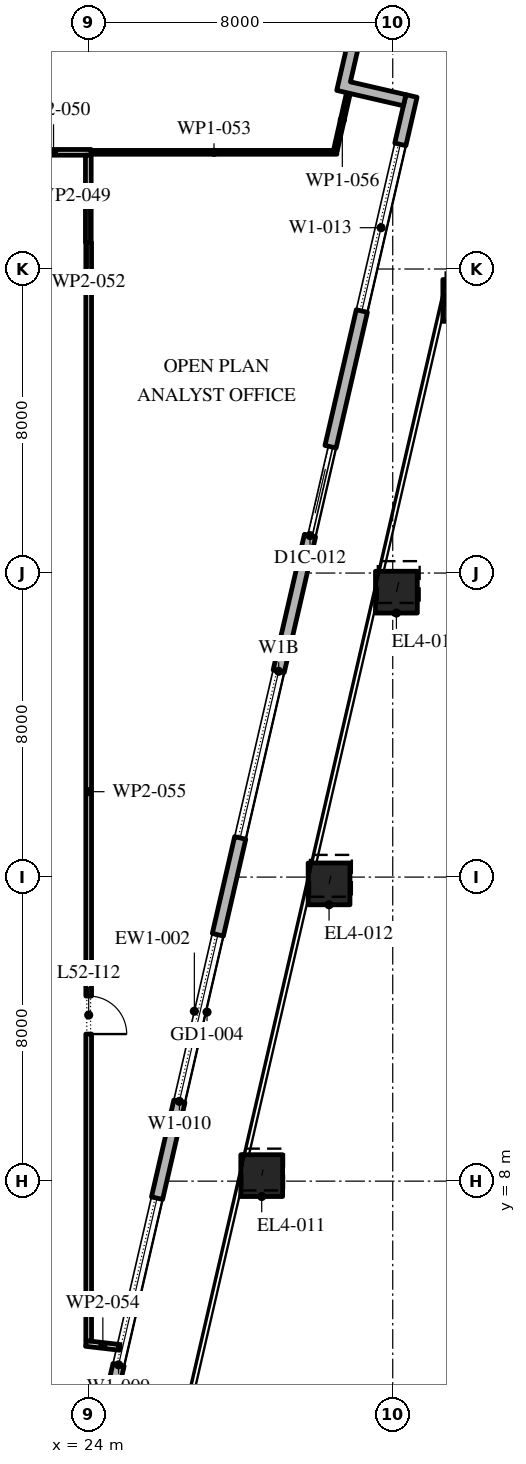
"""IFC4 building model, lengths in metres.
Left out: names, types, materials, properties, quantities, classifications, styles, units other than length and angle.
Written with IfcOpenShell. Run it as: python <this file> out.ifc"""

import sys

from ifc_helpers import new_model, si_unit, direction, frame, frame_2d, origin, origin_2d, place, context, subcontext, project, spatial, polyline, rectangle, outline, extrude, element, fill, save


model = new_model("IFC4")
c1 = context("Model", 3, precision=1e-05, world=origin(), true_north=direction((0.0, 1.0)))
c2 = subcontext(c1, "Body", "Model", "MODEL_VIEW")
j1 = project(units=[si_unit("LENGTHUNIT", "METRE"), si_unit("PLANEANGLEUNIT", "RADIAN")], contexts=[c1])
p1 = place(None, origin())
s1 = spatial("IfcSite", under=j1, at=p1, CompositionType="ELEMENT")
p2 = place(p1, origin())
s2 = spatial("IfcBuilding", under=s1, at=p2, CompositionType="ELEMENT")
p3 = place(p2, frame((0.0, 0.0, 243.0)))
s3 = spatial("IfcBuildingStorey", under=s2, at=p3, CompositionType="ELEMENT", Elevation=243.0)
p4 = place(p3, frame((28.552, 8.146, 0.0), z_axis=(0.008770884695, 0.037929719907, 0.99924191662), x_axis=(-0.974290512438, 0.225295355862, 0.0)))
e1 = element("IfcColumn", 1, at=p4, inside=s3, PredefinedType="COLUMN", context=c2, shape_type="SweptSolid", body=[
    extrude(rectangle(XDim=1.1, YDim=1.1, at=origin_2d()), origin(), (0.0, 0.0, 1.0), 4.203),
])
p5 = place(p3, frame((30.325, 15.822, 0.0), z_axis=(0.011668267153, 0.050562490995, 0.998652735462), x_axis=(-0.974391195695, 0.224859506699, 0.0)))
e2 = element("IfcColumn", 2, at=p5, inside=s3, PredefinedType="COLUMN", context=c2, shape_type="SweptSolid", body=[
    extrude(rectangle(XDim=1.1, YDim=1.1, at=origin_2d()), origin(), (0.0, 0.0, 1.0), 4.206),
])
p6 = place(p3, frame((32.097, 23.498, 0.0), z_axis=(0.014617836866, 0.063111930596, 0.997899395261), x_axis=(-0.974209784844, 0.225644178107, 0.0)))
e3 = element("IfcColumn", 3, at=p6, inside=s3, PredefinedType="COLUMN", context=c2, shape_type="SweptSolid", body=[
    extrude(rectangle(XDim=1.1, YDim=1.1, at=origin_2d()), origin(), (0.0, 0.0, 1.0), 4.209),
])
p7 = place(p3, frame((33.869, 31.174, 0.0), z_axis=(0.017502025619, 0.075687567741, 0.996977969259), x_axis=(-0.974290512438, 0.225295355862, 0.0)))
e4 = element("IfcColumn", 4, at=p7, inside=s3, PredefinedType="COLUMN", context=c2, shape_type="SweptSolid", body=[
    extrude(rectangle(XDim=1.1, YDim=1.1, at=origin_2d()), origin(), (0.0, 0.0, 1.0), 4.213),
])
p8 = place(p3, frame((21.359, -11.678, 0.0), z_axis=(0.0, 0.0, 1.0), x_axis=(0.224949198343, 0.974370493275, 0.0)))
e5 = element("IfcWall", 5, at=p8, inside=s3, PredefinedType="STANDARD", context=c2, shape_type="SweptSolid", body=[
    extrude(rectangle(XDim=49.5, YDim=0.3, at=frame_2d((24.75, 0.0))), origin(), (0.0, 0.0, 1.0), 4.0),
])
p9 = place(p8, frame((1.157, 0.0, 0.45)))
e6 = element("IfcOpeningElement", 6, at=p9, cuts=e5, PredefinedType="OPENING", context=c2, shape_type="SweptSolid", body=[
    extrude(rectangle(XDim=4.5, YDim=3.05, at=frame_2d((2.25, 1.525))), frame((0.0, 0.16, 0.0), z_axis=(0.0, -1.0, 0.0), x_axis=(1.0, 0.0, 0.0)), (0.0, 0.0, 1.0), 0.32),
])
p10 = place(p8, frame((8.121, 0.0, 0.45)))
e7 = element("IfcOpeningElement", 7, at=p10, cuts=e5, PredefinedType="OPENING", context=c2, shape_type="SweptSolid", body=[
    extrude(rectangle(XDim=4.5, YDim=3.05, at=frame_2d((2.25, 1.525))), frame((0.0, 0.16, 0.0), z_axis=(0.0, -1.0, 0.0), x_axis=(1.0, 0.0, 0.0)), (0.0, 0.0, 1.0), 0.32),
])
p11 = place(p8, frame((15.236, 0.0, 0.45)))
e8 = element("IfcOpeningElement", 8, at=p11, cuts=e5, PredefinedType="OPENING", context=c2, shape_type="SweptSolid", body=[
    extrude(rectangle(XDim=4.5, YDim=3.05, at=frame_2d((2.25, 1.525))), frame((0.0, 0.16, 0.0), z_axis=(0.0, -1.0, 0.0), x_axis=(1.0, 0.0, 0.0)), (0.0, 0.0, 1.0), 0.32),
])
p12 = place(p8, frame((22.35, 0.0, 0.45)))
e9 = element("IfcOpeningElement", 9, at=p12, cuts=e5, PredefinedType="OPENING", context=c2, shape_type="SweptSolid", body=[
    extrude(rectangle(XDim=4.5, YDim=3.05, at=frame_2d((2.25, 1.525))), frame((0.0, 0.16, 0.0), z_axis=(0.0, -1.0, 0.0), x_axis=(1.0, 0.0, 0.0)), (0.0, 0.0, 1.0), 0.32),
])
p13 = place(p8, frame((29.464, 0.0, 0.45)))
e10 = element("IfcOpeningElement", 10, at=p13, cuts=e5, PredefinedType="OPENING", context=c2, shape_type="SweptSolid", body=[
    extrude(rectangle(XDim=4.5, YDim=2.95, at=frame_2d((2.25, 1.475))), frame((0.0, 0.16, 0.0), z_axis=(0.0, -1.0, 0.0), x_axis=(1.0, 0.0, 0.0)), (0.0, 0.0, 1.0), 0.32),
])
p14 = place(p8, frame((37.628, 0.0, 0.0)))
e11 = element("IfcOpeningElement", 11, at=p14, cuts=e5, PredefinedType="OPENING", context=c2, shape_type="SweptSolid", body=[
    extrude(rectangle(XDim=2.4, YDim=3.325, at=frame_2d((1.2, 1.663))), frame((0.0, 0.16, 0.0), z_axis=(0.0, -1.0, 0.0), x_axis=(1.0, 0.0, 0.0)), (0.0, 0.0, 1.0), 0.32),
])
p15 = place(p8, frame((43.693, 0.0, 0.45)))
e12 = element("IfcOpeningElement", 12, at=p15, cuts=e5, PredefinedType="OPENING", context=c2, shape_type="SweptSolid", body=[
    extrude(rectangle(XDim=4.5, YDim=3.05, at=frame_2d((2.25, 1.525))), frame((0.0, 0.16, 0.0), z_axis=(0.0, -1.0, 0.0), x_axis=(1.0, 0.0, 0.0)), (0.0, 0.0, 1.0), 0.32),
])
p16 = place(p3, origin())
e13 = element("IfcWall", 13, at=p16, inside=s3, PredefinedType="STANDARD", context=c2, shape_type="SweptSolid", body=[
    extrude(outline(polyline([(30.931, 38.453), (29.177, 38.858), (29.65, 40.905), (29.942, 40.837), (29.537, 39.083), (31.291, 38.678), (30.886, 36.924), (32.348, 36.587), (32.28, 36.295), (30.526, 36.699), (30.931, 38.453)])), origin(), (0.0, 0.0, 1.0), 4.0),
])
p17 = place(p3, frame((22.085, 35.07, 0.0), z_axis=(0.0, 0.0, 1.0), x_axis=(1.0, 0.0, 0.0)))
e14 = element("IfcWall", 14, at=p17, inside=s3, PredefinedType="PARTITIONING", context=c2, shape_type="SweptSolid", body=[
    extrude(rectangle(XDim=1.98, YDim=0.15, at=frame_2d((0.99, 0.0))), origin(), (0.0, 0.0, 1.0), 4.0),
])
p18 = place(p3, frame((23.99, 34.995, 0.0), z_axis=(0.0, 0.0, 1.0), x_axis=(0.0, -1.0, 0.0)))
e15 = element("IfcWall", 15, at=p18, inside=s3, PredefinedType="PARTITIONING", context=c2, shape_type="SweptSolid", body=[
    extrude(rectangle(XDim=2.295, YDim=0.15, at=frame_2d((1.147, 0.0))), origin(), (0.0, 0.0, 1.0), 4.0),
])
p19 = place(p3, frame((24.065, 35.07, 0.0), z_axis=(0.0, 0.0, 1.0), x_axis=(1.0, 0.0, 0.0)))
e16 = element("IfcWall", 16, at=p19, inside=s3, PredefinedType="PARTITIONING", context=c2, shape_type="SweptSolid", body=[
    extrude(rectangle(XDim=6.465, YDim=0.1, at=frame_2d((3.232, 0.0))), origin(), (0.0, 0.0, 1.0), 4.0),
])
p20 = place(p3, frame((23.925, 3.729, 0.0), z_axis=(0.0, 0.0, 1.0), x_axis=(0.993316052643, -0.115426251616, 0.0)))
e17 = element("IfcWall", 17, at=p20, inside=s3, PredefinedType="PARTITIONING", context=c2, shape_type="SweptSolid", body=[
    extrude(rectangle(XDim=0.901, YDim=0.15, at=frame_2d((0.451, 0.0))), origin(), (0.0, 0.0, 1.0), 4.0),
])
p21 = place(p3, frame((24.0, 32.7, 0.0), z_axis=(0.0, 0.0, 1.0), x_axis=(0.0, -1.0, 0.0)))
e18 = element("IfcWall", 18, at=p21, inside=s3, PredefinedType="PARTITIONING", context=c2, shape_type="SweptSolid", body=[
    extrude(rectangle(XDim=28.905, YDim=0.15, at=frame_2d((14.453, 0.0))), origin(), (0.0, 0.0, 1.0), 4.0),
])
p22 = place(p21, frame((19.83, 0.0, 0.0)))
e19 = element("IfcOpeningElement", 19, at=p22, cuts=e18, PredefinedType="OPENING", context=c2, shape_type="SweptSolid", body=[
    extrude(rectangle(XDim=1.0, YDim=2.1, at=frame_2d((0.5, 1.05))), frame((0.0, 0.085, 0.0), z_axis=(0.0, -1.0, 0.0), x_axis=(1.0, 0.0, 0.0)), (0.0, 0.0, 1.0), 0.17),
])
p23 = place(p3, frame((30.491, 35.119, 0.0), z_axis=(0.0, 0.0, 1.0), x_axis=(0.221461033886, 0.975169221453, 0.0)))
e20 = element("IfcWall", 20, at=p23, inside=s3, PredefinedType="PARTITIONING", context=c2, shape_type="SweptSolid", body=[
    extrude(rectangle(XDim=1.648, YDim=0.1, at=frame_2d((0.824, 0.0))), origin(), (0.0, 0.0, 1.0), 4.0),
])
p24 = place(p11, origin())
e21 = element("IfcWindow", 21, at=p24, inside=s3, PartitioningType="DOUBLE_PANEL_VERTICAL", PredefinedType="WINDOW", context=c2, shape_type="SweptSolid", body=[
    extrude(rectangle(XDim=4.5, YDim=3.05, at=frame_2d((2.25, 1.525))), frame((0.0, 0.03, 0.0), z_axis=(0.0, -1.0, 0.0), x_axis=(1.0, 0.0, 0.0)), (0.0, 0.0, 1.0), 0.06),
])
fill(e8, e21)
p25 = place(p12, origin())
e22 = element("IfcWindow", 22, at=p25, inside=s3, PartitioningType="DOUBLE_PANEL_VERTICAL", PredefinedType="WINDOW", context=c2, shape_type="SweptSolid", body=[
    extrude(rectangle(XDim=4.5, YDim=3.05, at=frame_2d((2.25, 1.525))), frame((0.0, 0.03, 0.0), z_axis=(0.0, -1.0, 0.0), x_axis=(1.0, 0.0, 0.0)), (0.0, 0.0, 1.0), 0.06),
])
fill(e9, e22)
p26 = place(p13, origin())
e23 = element("IfcWindow", 23, at=p26, inside=s3, PartitioningType="DOUBLE_PANEL_VERTICAL", PredefinedType="WINDOW", context=c2, shape_type="SweptSolid", body=[
    extrude(rectangle(XDim=4.5, YDim=2.95, at=frame_2d((2.25, 1.475))), frame((0.0, 0.03, 0.0), z_axis=(0.0, -1.0, 0.0), x_axis=(1.0, 0.0, 0.0)), (0.0, 0.0, 1.0), 0.06),
])
fill(e10, e23)
p27 = place(p14, origin())
e24 = element("IfcDoor", 24, at=p27, inside=s3, OperationType="DOUBLE_DOOR_SLIDING", PredefinedType="DOOR", context=c2, shape_type="SweptSolid", body=[
    extrude(rectangle(XDim=2.4, YDim=3.325, at=frame_2d((1.2, 1.663))), frame((0.0, 0.025, 0.0), z_axis=(0.0, -1.0, 0.0), x_axis=(1.0, 0.0, 0.0)), (0.0, 0.0, 1.0), 0.05),
])
fill(e11, e24)
p28 = place(p15, origin())
e25 = element("IfcWindow", 25, at=p28, inside=s3, PartitioningType="DOUBLE_PANEL_VERTICAL", PredefinedType="WINDOW", context=c2, shape_type="SweptSolid", body=[
    extrude(rectangle(XDim=4.5, YDim=3.05, at=frame_2d((2.25, 1.525))), frame((0.0, 0.03, 0.0), z_axis=(0.0, -1.0, 0.0), x_axis=(1.0, 0.0, 0.0)), (0.0, 0.0, 1.0), 0.06),
])
fill(e12, e25)
p29 = place(p22, origin())
e26 = element("IfcDoor", 26, at=p29, inside=s3, OperationType="SINGLE_SWING_LEFT", PredefinedType="DOOR", context=c2, shape_type="SweptSolid", body=[
    extrude(rectangle(XDim=1.0, YDim=2.1, at=frame_2d((0.5, 1.05))), frame((0.0, 0.025, 0.0), z_axis=(0.0, -1.0, 0.0), x_axis=(1.0, 0.0, 0.0)), (0.0, 0.0, 1.0), 0.05),
])
fill(e19, e26)
save(model, sys.argv[1])
